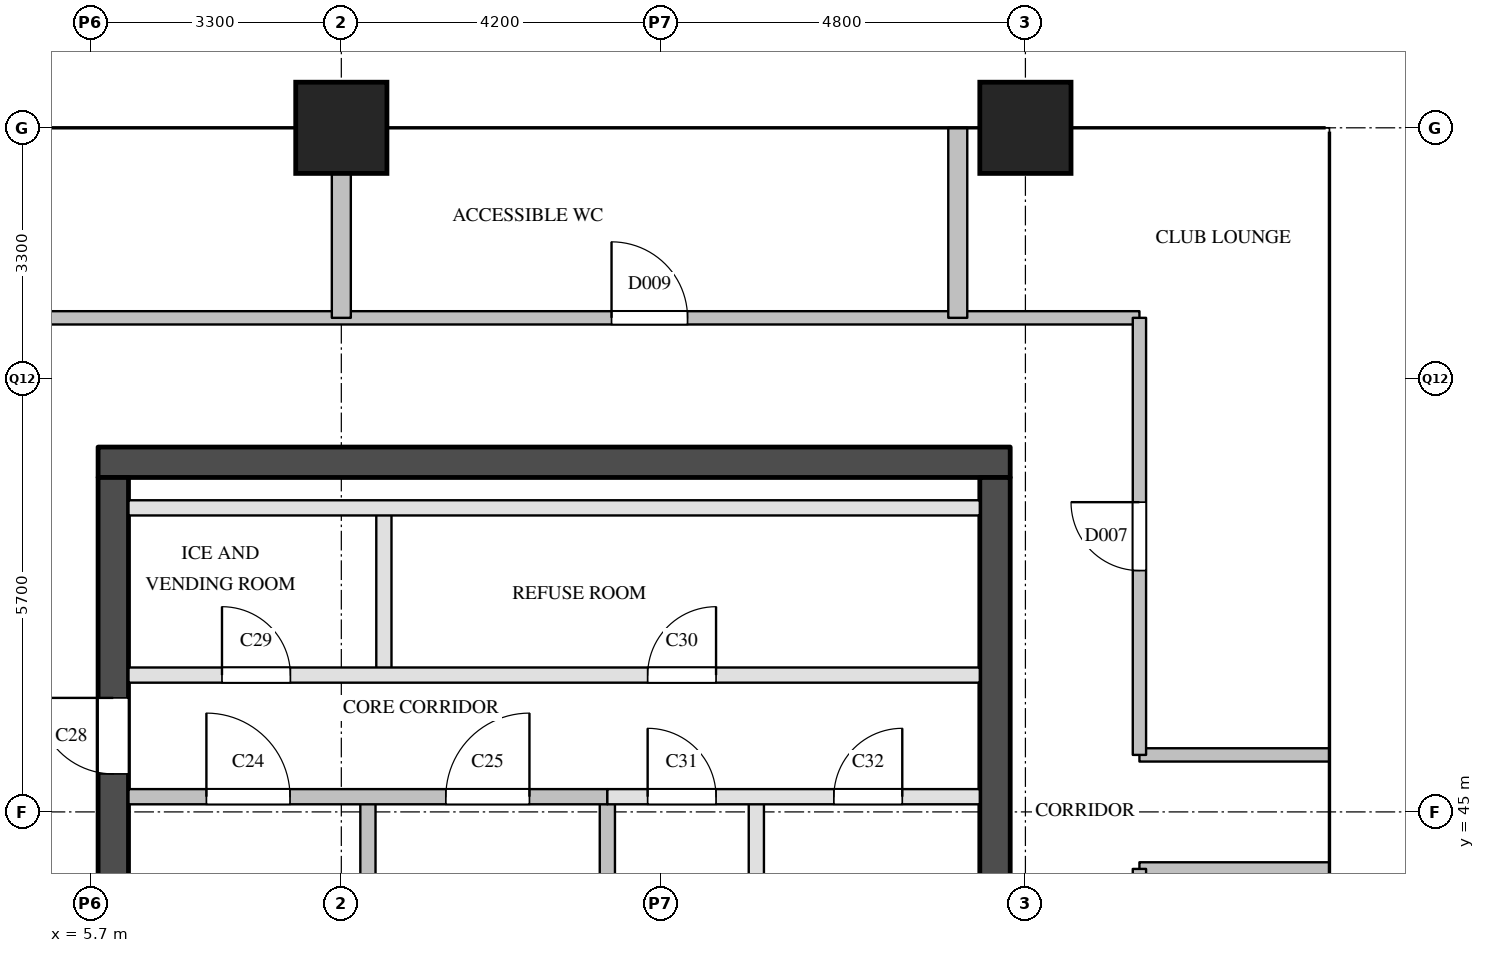
"""IFC4 building model, lengths in metres.
Left out: names, types, materials, properties, quantities, classifications, styles, units other than length and angle.
Written with IfcOpenShell. Run it as: python <this file> out.ifc"""

import sys

from ifc_helpers import new_model, si_unit, direction, frame, frame_2d, origin, origin_2d, place, context, subcontext, project, spatial, rectangle, extrude, element, fill, save


model = new_model("IFC4")
c1 = context("Model", 3, precision=1e-05, world=origin(), true_north=direction((0.0, 1.0)))
c2 = subcontext(c1, "Body", "Model", "MODEL_VIEW")
j1 = project(units=[si_unit("LENGTHUNIT", "METRE"), si_unit("PLANEANGLEUNIT", "RADIAN")], contexts=[c1])
p1 = place(None, origin())
s1 = spatial("IfcSite", under=j1, at=p1, CompositionType="ELEMENT")
p2 = place(p1, origin())
s2 = spatial("IfcBuilding", under=s1, at=p2, CompositionType="ELEMENT")
p3 = place(p2, frame((0.0, 0.0, 218.9)))
s3 = spatial("IfcBuildingStorey", under=s2, at=p3, CompositionType="ELEMENT", Elevation=218.9)
for number, where, z_axis, x_axis in (
    (1, (9.0, 54.0, 0.0), (0.0, 0.0, 1.0), (1.0, 0.0, 0.0)),
    (2, (18.0, 54.0, 0.0), (0.0, 0.0, 1.0), (1.0, 0.0, 0.0)),
):
    element("IfcColumn", number, at=place(p3, frame(where, z_axis=z_axis, x_axis=x_axis)), inside=s3, PredefinedType="COLUMN", context=c2, shape_type="SweptSolid", body=[
        extrude(rectangle(XDim=1.2, YDim=1.2, at=origin_2d()), origin(), (0.0, 0.0, 1.0), 3.9),
    ])
p4 = place(p3, frame((5.8, 49.6, 0.0), z_axis=(0.0, 0.0, 1.0), x_axis=(1.0, 0.0, 0.0)))
e3 = element("IfcWall", 3, at=p4, inside=s3, PredefinedType="SHEAR", context=c2, shape_type="SweptSolid", body=[
    extrude(rectangle(XDim=12.0, YDim=0.4, at=frame_2d((6.0, 0.0))), origin(), (0.0, 0.0, 1.0), 3.6),
])
p5 = place(p3, frame((6.0, 29.1, 0.0), z_axis=(0.0, 0.0, 1.0), x_axis=(0.0, 1.0, 0.0)))
e4 = element("IfcWall", 4, at=p5, inside=s3, PredefinedType="SHEAR", context=c2, shape_type="SweptSolid", body=[
    extrude(rectangle(XDim=20.3, YDim=0.4, at=frame_2d((10.15, 0.0))), origin(), (0.0, 0.0, 1.0), 3.6),
])
p6 = place(p5, frame((3.45, 0.0, 0.0)))
e5 = element("IfcOpeningElement", 5, at=p6, cuts=e4, PredefinedType="OPENING", context=c2, shape_type="SweptSolid", body=[
    extrude(rectangle(XDim=1.0, YDim=2.1, at=frame_2d((0.5, 1.05))), frame((0.0, 0.21, 0.0), z_axis=(0.0, -1.0, 0.0), x_axis=(1.0, 0.0, 0.0)), (0.0, 0.0, 1.0), 0.42),
])
p7 = place(p5, frame((16.4, 0.0, 0.0)))
e6 = element("IfcOpeningElement", 6, at=p7, cuts=e4, PredefinedType="OPENING", context=c2, shape_type="SweptSolid", body=[
    extrude(rectangle(XDim=1.0, YDim=2.1, at=frame_2d((0.5, 1.05))), frame((0.0, 0.21, 0.0), z_axis=(0.0, -1.0, 0.0), x_axis=(1.0, 0.0, 0.0)), (0.0, 0.0, 1.0), 0.42),
])
p8 = place(p3, frame((17.6, 29.1, 0.0), z_axis=(0.0, 0.0, 1.0), x_axis=(0.0, 1.0, 0.0)))
e7 = element("IfcWall", 7, at=p8, inside=s3, PredefinedType="SHEAR", context=c2, shape_type="SweptSolid", body=[
    extrude(rectangle(XDim=20.3, YDim=0.4, at=frame_2d((10.15, 0.0))), origin(), (0.0, 0.0, 1.0), 3.6),
])
p9 = place(p8, frame((1.25, 0.0, 0.0)))
e8 = element("IfcOpeningElement", 8, at=p9, cuts=e7, PredefinedType="OPENING", context=c2, shape_type="SweptSolid", body=[
    extrude(rectangle(XDim=0.7, YDim=2.1, at=frame_2d((0.35, 1.05))), frame((0.0, 0.21, 0.0), z_axis=(0.0, -1.0, 0.0), x_axis=(1.0, 0.0, 0.0)), (0.0, 0.0, 1.0), 0.42),
])
p10 = place(p8, frame((7.05, 0.0, 0.0)))
e9 = element("IfcOpeningElement", 9, at=p10, cuts=e7, PredefinedType="OPENING", context=c2, shape_type="SweptSolid", body=[
    extrude(rectangle(XDim=0.7, YDim=2.1, at=frame_2d((0.35, 1.05))), frame((0.0, 0.21, 0.0), z_axis=(0.0, -1.0, 0.0), x_axis=(1.0, 0.0, 0.0)), (0.0, 0.0, 1.0), 0.42),
])
p11 = place(p8, frame((3.6, 0.0, 0.0)))
e10 = element("IfcOpeningElement", 10, at=p11, cuts=e7, PredefinedType="OPENING", context=c2, shape_type="SweptSolid", body=[
    extrude(rectangle(XDim=1.8, YDim=2.1, at=frame_2d((0.9, 1.05))), frame((0.0, 0.21, 0.0), z_axis=(0.0, -1.0, 0.0), x_axis=(1.0, 0.0, 0.0)), (0.0, 0.0, 1.0), 0.42),
])
p12 = place(p3, frame((9.35, 40.9, 0.0), z_axis=(0.0, 0.0, 1.0), x_axis=(0.0, 1.0, 0.0)))
e11 = element("IfcWall", 11, at=p12, inside=s3, PredefinedType="SOLIDWALL", context=c2, shape_type="SweptSolid", body=[
    extrude(rectangle(XDim=4.3, YDim=0.2, at=frame_2d((2.15, 0.0))), origin(), (0.0, 0.0, 1.0), 3.6),
])
p13 = place(p3, frame((9.56, 46.8, 0.0), z_axis=(0.0, 0.0, 1.0), x_axis=(0.0, 1.0, 0.0)))
e12 = element("IfcWall", 12, at=p13, inside=s3, PredefinedType="PARTITIONING", context=c2, shape_type="SweptSolid", body=[
    extrude(rectangle(XDim=2.2, YDim=0.2, at=frame_2d((1.1, 0.0))), origin(), (0.0, 0.0, 1.0), 3.6),
])
p14 = place(p3, frame((12.5, 40.9, 0.0), z_axis=(0.0, 0.0, 1.0), x_axis=(0.0, 1.0, 0.0)))
e13 = element("IfcWall", 13, at=p14, inside=s3, PredefinedType="SOLIDWALL", context=c2, shape_type="SweptSolid", body=[
    extrude(rectangle(XDim=4.3, YDim=0.2, at=frame_2d((2.15, 0.0))), origin(), (0.0, 0.0, 1.0), 3.6),
])
p15 = place(p3, frame((14.46, 39.0, 0.0), z_axis=(0.0, 0.0, 1.0), x_axis=(0.0, 1.0, 0.0)))
e14 = element("IfcWall", 14, at=p15, inside=s3, PredefinedType="PARTITIONING", context=c2, shape_type="SweptSolid", body=[
    extrude(rectangle(XDim=6.2, YDim=0.2, at=frame_2d((3.1, 0.0))), origin(), (0.0, 0.0, 1.0), 3.6),
])
p16 = place(p3, frame((12.5, 45.2, 0.0), z_axis=(0.0, 0.0, 1.0), x_axis=(1.0, 0.0, 0.0)))
e15 = element("IfcWall", 15, at=p16, inside=s3, PredefinedType="PARTITIONING", context=c2, shape_type="SweptSolid", body=[
    extrude(rectangle(XDim=4.9, YDim=0.2, at=frame_2d((2.45, 0.0))), origin(), (0.0, 0.0, 1.0), 3.6),
])
p17 = place(p16, frame((0.53, 0.0, 0.0)))
e16 = element("IfcOpeningElement", 16, at=p17, cuts=e15, PredefinedType="OPENING", context=c2, shape_type="SweptSolid", body=[
    extrude(rectangle(XDim=0.9, YDim=2.1, at=frame_2d((0.45, 1.05))), frame((0.0, 0.11, 0.0), z_axis=(0.0, -1.0, 0.0), x_axis=(1.0, 0.0, 0.0)), (0.0, 0.0, 1.0), 0.22),
])
p18 = place(p16, frame((2.98, 0.0, 0.0)))
e17 = element("IfcOpeningElement", 17, at=p18, cuts=e15, PredefinedType="OPENING", context=c2, shape_type="SweptSolid", body=[
    extrude(rectangle(XDim=0.9, YDim=2.1, at=frame_2d((0.45, 1.05))), frame((0.0, 0.11, 0.0), z_axis=(0.0, -1.0, 0.0), x_axis=(1.0, 0.0, 0.0)), (0.0, 0.0, 1.0), 0.22),
])
p19 = place(p3, frame((6.2, 45.2, 0.0), z_axis=(0.0, 0.0, 1.0), x_axis=(1.0, 0.0, 0.0)))
e18 = element("IfcWall", 18, at=p19, inside=s3, PredefinedType="SOLIDWALL", context=c2, shape_type="SweptSolid", body=[
    extrude(rectangle(XDim=6.3, YDim=0.2, at=frame_2d((3.15, 0.0))), origin(), (0.0, 0.0, 1.0), 3.6),
])
p20 = place(p19, frame((1.025, 0.0, 0.0)))
e19 = element("IfcOpeningElement", 19, at=p20, cuts=e18, PredefinedType="OPENING", context=c2, shape_type="SweptSolid", body=[
    extrude(rectangle(XDim=1.1, YDim=2.1, at=frame_2d((0.55, 1.05))), frame((0.0, 0.11, 0.0), z_axis=(0.0, -1.0, 0.0), x_axis=(1.0, 0.0, 0.0)), (0.0, 0.0, 1.0), 0.22),
])
p21 = place(p19, frame((4.175, 0.0, 0.0)))
e20 = element("IfcOpeningElement", 20, at=p21, cuts=e18, PredefinedType="OPENING", context=c2, shape_type="SweptSolid", body=[
    extrude(rectangle(XDim=1.1, YDim=2.1, at=frame_2d((0.55, 1.05))), frame((0.0, 0.11, 0.0), z_axis=(0.0, -1.0, 0.0), x_axis=(1.0, 0.0, 0.0)), (0.0, 0.0, 1.0), 0.22),
])
p22 = place(p3, frame((6.2, 46.8, 0.0), z_axis=(0.0, 0.0, 1.0), x_axis=(1.0, 0.0, 0.0)))
e21 = element("IfcWall", 21, at=p22, inside=s3, PredefinedType="PARTITIONING", context=c2, shape_type="SweptSolid", body=[
    extrude(rectangle(XDim=11.2, YDim=0.2, at=frame_2d((5.6, 0.0))), origin(), (0.0, 0.0, 1.0), 3.6),
])
p23 = place(p22, frame((1.23, 0.0, 0.0)))
e22 = element("IfcOpeningElement", 22, at=p23, cuts=e21, PredefinedType="OPENING", context=c2, shape_type="SweptSolid", body=[
    extrude(rectangle(XDim=0.9, YDim=2.1, at=frame_2d((0.45, 1.05))), frame((0.0, 0.11, 0.0), z_axis=(0.0, -1.0, 0.0), x_axis=(1.0, 0.0, 0.0)), (0.0, 0.0, 1.0), 0.22),
])
p24 = place(p22, frame((6.83, 0.0, 0.0)))
e23 = element("IfcOpeningElement", 23, at=p24, cuts=e21, PredefinedType="OPENING", context=c2, shape_type="SweptSolid", body=[
    extrude(rectangle(XDim=0.9, YDim=2.1, at=frame_2d((0.45, 1.05))), frame((0.0, 0.11, 0.0), z_axis=(0.0, -1.0, 0.0), x_axis=(1.0, 0.0, 0.0)), (0.0, 0.0, 1.0), 0.22),
])
p25 = place(p3, frame((6.2, 49.0, 0.0), z_axis=(0.0, 0.0, 1.0), x_axis=(1.0, 0.0, 0.0)))
e24 = element("IfcWall", 24, at=p25, inside=s3, PredefinedType="PARTITIONING", context=c2, shape_type="SweptSolid", body=[
    extrude(rectangle(XDim=11.2, YDim=0.2, at=frame_2d((5.6, 0.0))), origin(), (0.0, 0.0, 1.0), 3.6),
])
for number, where, z_axis, x_axis in (
    (25, (19.5, 44.25, 0.0), (0.0, 0.0, 1.0), (1.0, 0.0, 0.0)),
    (26, (19.5, 45.75, 0.0), (0.0, 0.0, 1.0), (1.0, 0.0, 0.0)),
):
    element("IfcWall", number, at=place(p3, frame(where, z_axis=z_axis, x_axis=x_axis)), inside=s3, PredefinedType="PARTITIONING", context=c2, shape_type="SweptSolid", body=[
        extrude(rectangle(XDim=2.5, YDim=0.175, at=frame_2d((1.25, 0.0))), origin(), (0.0, 0.0, 1.0), 3.6),
    ])
p26 = place(p3, frame((4.1, 51.5, 0.0), z_axis=(0.0, 0.0, 1.0), x_axis=(1.0, 0.0, 0.0)))
e27 = element("IfcWall", 27, at=p26, inside=s3, PredefinedType="PARTITIONING", context=c2, shape_type="SweptSolid", body=[
    extrude(rectangle(XDim=15.4, YDim=0.175, at=frame_2d((7.7, 0.0))), origin(), (0.0, 0.0, 1.0), 3.6),
])
p27 = place(p26, frame((8.455, 0.0, 0.0)))
e28 = element("IfcOpeningElement", 28, at=p27, cuts=e27, PredefinedType="OPENING", context=c2, shape_type="SweptSolid", body=[
    extrude(rectangle(XDim=1.0, YDim=2.1, at=frame_2d((0.5, 1.05))), frame((0.0, 0.097, 0.0), z_axis=(0.0, -1.0, 0.0), x_axis=(1.0, 0.0, 0.0)), (0.0, 0.0, 1.0), 0.195),
])
p28 = place(p3, frame((19.5, 28.5, 0.0), z_axis=(0.0, 0.0, 1.0), x_axis=(0.0, 1.0, 0.0)))
e29 = element("IfcWall", 29, at=p28, inside=s3, PredefinedType="PARTITIONING", context=c2, shape_type="SweptSolid", body=[
    extrude(rectangle(XDim=15.75, YDim=0.175, at=frame_2d((7.875, 0.0))), origin(), (0.0, 0.0, 1.0), 3.6),
])
p29 = place(p28, frame((11.125, 0.0, 0.0)))
e30 = element("IfcOpeningElement", 30, at=p29, cuts=e29, PredefinedType="OPENING", context=c2, shape_type="SweptSolid", body=[
    extrude(rectangle(XDim=1.0, YDim=2.1, at=frame_2d((0.5, 1.05))), frame((0.0, 0.097, 0.0), z_axis=(0.0, -1.0, 0.0), x_axis=(1.0, 0.0, 0.0)), (0.0, 0.0, 1.0), 0.195),
])
p30 = place(p3, frame((19.5, 45.75, 0.0), z_axis=(0.0, 0.0, 1.0), x_axis=(0.0, 1.0, 0.0)))
e31 = element("IfcWall", 31, at=p30, inside=s3, PredefinedType="PARTITIONING", context=c2, shape_type="SweptSolid", body=[
    extrude(rectangle(XDim=5.75, YDim=0.175, at=frame_2d((2.875, 0.0))), origin(), (0.0, 0.0, 1.0), 3.6),
])
p31 = place(p30, frame((2.425, 0.0, 0.0)))
e32 = element("IfcOpeningElement", 32, at=p31, cuts=e31, PredefinedType="OPENING", context=c2, shape_type="SweptSolid", body=[
    extrude(rectangle(XDim=0.9, YDim=2.1, at=frame_2d((0.45, 1.05))), frame((0.0, 0.097, 0.0), z_axis=(0.0, -1.0, 0.0), x_axis=(1.0, 0.0, 0.0)), (0.0, 0.0, 1.0), 0.195),
])
p32 = place(p3, frame((9.0, 51.5, 0.0), z_axis=(0.0, 0.0, 1.0), x_axis=(0.0, 1.0, 0.0)))
e33 = element("IfcWall", 33, at=p32, inside=s3, PredefinedType="PARTITIONING", context=c2, shape_type="SweptSolid", body=[
    extrude(rectangle(XDim=2.5, YDim=0.25, at=frame_2d((1.25, 0.0))), origin(), (0.0, 0.0, 1.0), 3.6),
])
p33 = place(p3, frame((17.11, 51.5, 0.0), z_axis=(0.0, 0.0, 1.0), x_axis=(0.0, 1.0, 0.0)))
e34 = element("IfcWall", 34, at=p33, inside=s3, PredefinedType="PARTITIONING", context=c2, shape_type="SweptSolid", body=[
    extrude(rectangle(XDim=2.5, YDim=0.25, at=frame_2d((1.25, 0.0))), origin(), (0.0, 0.0, 1.0), 2.6),
])
p34 = place(p20, origin())
e35 = element("IfcDoor", 35, at=p34, inside=s3, OperationType="SINGLE_SWING_LEFT", PredefinedType="DOOR", context=c2, shape_type="SweptSolid", body=[
    extrude(rectangle(XDim=1.1, YDim=2.1, at=frame_2d((0.55, 1.05))), frame((0.0, 0.025, 0.0), z_axis=(0.0, -1.0, 0.0), x_axis=(1.0, 0.0, 0.0)), (0.0, 0.0, 1.0), 0.05),
])
fill(e19, e35)
p35 = place(p21, origin())
e36 = element("IfcDoor", 36, at=p35, inside=s3, OperationType="SINGLE_SWING_RIGHT", PredefinedType="DOOR", context=c2, shape_type="SweptSolid", body=[
    extrude(rectangle(XDim=1.1, YDim=2.1, at=frame_2d((0.55, 1.05))), frame((0.0, 0.025, 0.0), z_axis=(0.0, -1.0, 0.0), x_axis=(1.0, 0.0, 0.0)), (0.0, 0.0, 1.0), 0.05),
])
fill(e20, e36)
p36 = place(p7, origin())
e37 = element("IfcDoor", 37, at=p36, inside=s3, OperationType="SINGLE_SWING_RIGHT", PredefinedType="DOOR", context=c2, shape_type="SweptSolid", body=[
    extrude(rectangle(XDim=1.0, YDim=2.1, at=frame_2d((0.5, 1.05))), frame((0.0, 0.025, 0.0), z_axis=(0.0, -1.0, 0.0), x_axis=(1.0, 0.0, 0.0)), (0.0, 0.0, 1.0), 0.05),
])
fill(e6, e37)
p37 = place(p23, origin())
e38 = element("IfcDoor", 38, at=p37, inside=s3, OperationType="SINGLE_SWING_LEFT", PredefinedType="DOOR", context=c2, shape_type="SweptSolid", body=[
    extrude(rectangle(XDim=0.9, YDim=2.1, at=frame_2d((0.45, 1.05))), frame((0.0, 0.025, 0.0), z_axis=(0.0, -1.0, 0.0), x_axis=(1.0, 0.0, 0.0)), (0.0, 0.0, 1.0), 0.05),
])
fill(e22, e38)
p38 = place(p24, origin())
e39 = element("IfcDoor", 39, at=p38, inside=s3, OperationType="SINGLE_SWING_RIGHT", PredefinedType="DOOR", context=c2, shape_type="SweptSolid", body=[
    extrude(rectangle(XDim=0.9, YDim=2.1, at=frame_2d((0.45, 1.05))), frame((0.0, 0.025, 0.0), z_axis=(0.0, -1.0, 0.0), x_axis=(1.0, 0.0, 0.0)), (0.0, 0.0, 1.0), 0.05),
])
fill(e23, e39)
p39 = place(p17, origin())
e40 = element("IfcDoor", 40, at=p39, inside=s3, OperationType="SINGLE_SWING_LEFT", PredefinedType="DOOR", context=c2, shape_type="SweptSolid", body=[
    extrude(rectangle(XDim=0.9, YDim=2.1, at=frame_2d((0.45, 1.05))), frame((0.0, 0.025, 0.0), z_axis=(0.0, -1.0, 0.0), x_axis=(1.0, 0.0, 0.0)), (0.0, 0.0, 1.0), 0.05),
])
fill(e16, e40)
p40 = place(p18, origin())
e41 = element("IfcDoor", 41, at=p40, inside=s3, OperationType="SINGLE_SWING_RIGHT", PredefinedType="DOOR", context=c2, shape_type="SweptSolid", body=[
    extrude(rectangle(XDim=0.9, YDim=2.1, at=frame_2d((0.45, 1.05))), frame((0.0, 0.025, 0.0), z_axis=(0.0, -1.0, 0.0), x_axis=(1.0, 0.0, 0.0)), (0.0, 0.0, 1.0), 0.05),
])
fill(e17, e41)
p41 = place(p31, origin())
e42 = element("IfcDoor", 42, at=p41, inside=s3, OperationType="SINGLE_SWING_RIGHT", PredefinedType="DOOR", context=c2, shape_type="SweptSolid", body=[
    extrude(rectangle(XDim=0.9, YDim=2.1, at=frame_2d((0.45, 1.05))), frame((0.0, 0.025, 0.0), z_axis=(0.0, -1.0, 0.0), x_axis=(1.0, 0.0, 0.0)), (0.0, 0.0, 1.0), 0.05),
])
fill(e32, e42)
p42 = place(p27, origin())
e43 = element("IfcDoor", 43, at=p42, inside=s3, OperationType="SINGLE_SWING_LEFT", PredefinedType="DOOR", context=c2, shape_type="SweptSolid", body=[
    extrude(rectangle(XDim=1.0, YDim=2.1, at=frame_2d((0.5, 1.05))), frame((0.0, 0.025, 0.0), z_axis=(0.0, -1.0, 0.0), x_axis=(1.0, 0.0, 0.0)), (0.0, 0.0, 1.0), 0.05),
])
fill(e28, e43)
save(model, sys.argv[1])
